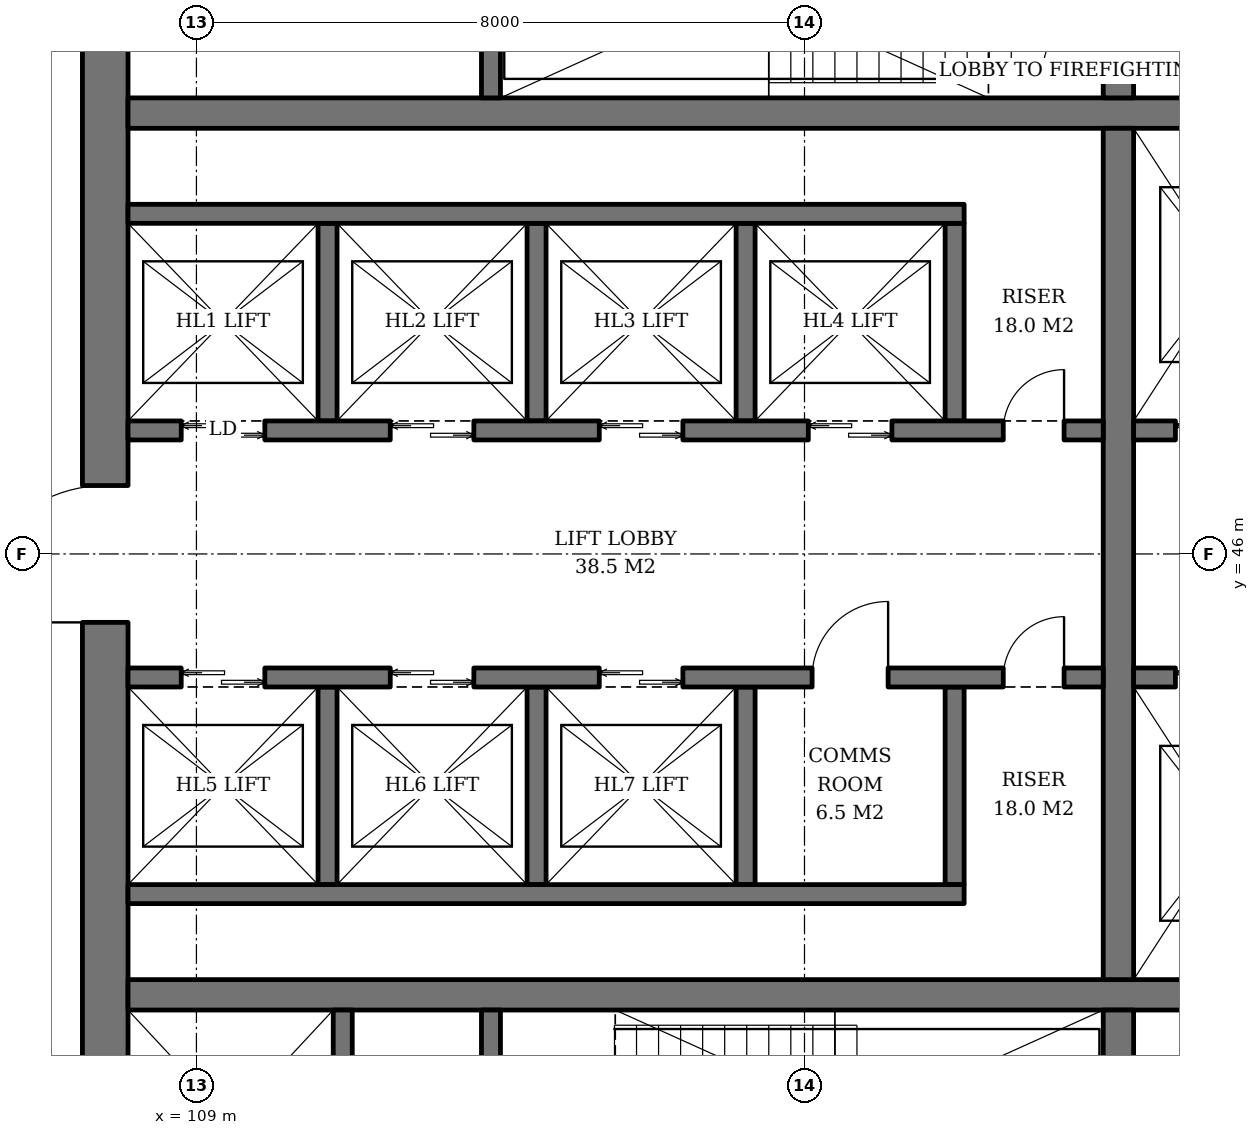
"""IFC4 building model, lengths in metres.
Left out: names, types, materials, properties, quantities, classifications, styles, units other than length and angle.
Written with IfcOpenShell. Run it as: python <this file> out.ifc"""

import sys

from ifc_helpers import new_model, si_unit, direction, frame, frame_2d, origin, place, context, subcontext, project, spatial, rectangle, extrude, element, fill, save


model = new_model("IFC4")
c1 = context("Model", 3, precision=1e-05, world=origin(), true_north=direction((0.0, 1.0)))
c2 = subcontext(c1, "Body", "Model", "MODEL_VIEW")
j1 = project(units=[si_unit("LENGTHUNIT", "METRE"), si_unit("PLANEANGLEUNIT", "RADIAN")], contexts=[c1])
p1 = place(None, origin())
s1 = spatial("IfcSite", under=j1, at=p1, CompositionType="ELEMENT")
p2 = place(p1, origin())
s2 = spatial("IfcBuilding", under=s1, at=p2, CompositionType="ELEMENT")
p3 = place(p2, frame((0.0, 0.0, 36.2)))
s3 = spatial("IfcBuildingStorey", under=s2, at=p3, CompositionType="ELEMENT", Elevation=36.2)
p4 = place(p3, frame((107.8, 37.1, 0.0), z_axis=(0.0, 0.0, 1.0), x_axis=(0.0, 1.0, 0.0)))
e1 = element("IfcWall", 1, at=p4, inside=s3, PredefinedType="SHEAR", context=c2, shape_type="SweptSolid", body=[
    extrude(rectangle(XDim=17.8, YDim=0.6, at=frame_2d((8.9, 0.0))), origin(), (0.0, 0.0, 1.0), 3.8),
])
p5 = place(p4, frame((8.0, 0.0, 0.0)))
e2 = element("IfcOpeningElement", 2, at=p5, cuts=e1, PredefinedType="OPENING", context=c2, shape_type="SweptSolid", body=[
    extrude(rectangle(XDim=1.8, YDim=2.4, at=frame_2d((0.9, 1.2))), frame((0.0, 0.31, 0.0), z_axis=(0.0, -1.0, 0.0), x_axis=(1.0, 0.0, 0.0)), (0.0, 0.0, 1.0), 0.62),
])
for number, where, z_axis, x_axis in (
    (3, (108.1, 40.2, 0.0), (0.0, 0.0, 1.0), (1.0, 0.0, 0.0)),
    (4, (108.1, 51.8, 0.0), (0.0, 0.0, 1.0), (1.0, 0.0, 0.0)),
):
    element("IfcWall", number, at=place(p3, frame(where, z_axis=z_axis, x_axis=x_axis)), inside=s3, PredefinedType="SHEAR", context=c2, shape_type="SweptSolid", body=[
        extrude(rectangle(XDim=17.8, YDim=0.4, at=frame_2d((8.9, 0.0))), origin(), (0.0, 0.0, 1.0), 3.8),
    ])
p6 = place(p3, frame((121.13, 37.1, 0.0), z_axis=(0.0, 0.0, 1.0), x_axis=(0.0, 1.0, 0.0)))
e5 = element("IfcWall", 5, at=p6, inside=s3, PredefinedType="SHEAR", context=c2, shape_type="SweptSolid", body=[
    extrude(rectangle(XDim=2.9, YDim=0.4, at=frame_2d((1.45, 0.0))), origin(), (0.0, 0.0, 1.0), 3.8),
])
p7 = place(p3, frame((121.13, 40.4, 0.0), z_axis=(0.0, 0.0, 1.0), x_axis=(0.0, 1.0, 0.0)))
e6 = element("IfcWall", 6, at=p7, inside=s3, PredefinedType="SHEAR", context=c2, shape_type="SweptSolid", body=[
    extrude(rectangle(XDim=11.2, YDim=0.4, at=frame_2d((5.6, 0.0))), origin(), (0.0, 0.0, 1.0), 3.8),
])
p8 = place(p3, frame((121.13, 52.0, 0.0), z_axis=(0.0, 0.0, 1.0), x_axis=(0.0, 1.0, 0.0)))
e7 = element("IfcWall", 7, at=p8, inside=s3, PredefinedType="SHEAR", context=c2, shape_type="SweptSolid", body=[
    extrude(rectangle(XDim=2.9, YDim=0.4, at=frame_2d((1.45, 0.0))), origin(), (0.0, 0.0, 1.0), 3.8),
])
p9 = place(p8, frame((0.3, 0.0, 0.0)))
e8 = element("IfcOpeningElement", 8, at=p9, cuts=e7, PredefinedType="OPENING", context=c2, shape_type="SweptSolid", body=[
    extrude(rectangle(XDim=1.0, YDim=2.1, at=frame_2d((0.5, 1.05))), frame((0.0, 0.21, 0.0), z_axis=(0.0, -1.0, 0.0), x_axis=(1.0, 0.0, 0.0)), (0.0, 0.0, 1.0), 0.42),
])
p10 = place(p3, frame((110.925, 37.1, 0.0), z_axis=(0.0, 0.0, 1.0), x_axis=(0.0, 1.0, 0.0)))
e9 = element("IfcWall", 9, at=p10, inside=s3, PredefinedType="SHEAR", context=c2, shape_type="SweptSolid", body=[
    extrude(rectangle(XDim=2.9, YDim=0.25, at=frame_2d((1.45, 0.0))), origin(), (0.0, 0.0, 1.0), 3.8),
])
p11 = place(p10, frame((0.8, 0.0, 0.0)))
e10 = element("IfcOpeningElement", 10, at=p11, cuts=e9, PredefinedType="OPENING", context=c2, shape_type="SweptSolid", body=[
    extrude(rectangle(XDim=1.3, YDim=2.2, at=frame_2d((0.65, 1.1))), frame((0.0, 0.135, 0.0), z_axis=(0.0, -1.0, 0.0), x_axis=(1.0, 0.0, 0.0)), (0.0, 0.0, 1.0), 0.27),
])
p12 = place(p3, frame((112.875, 37.1, 0.0), z_axis=(0.0, 0.0, 1.0), x_axis=(0.0, 1.0, 0.0)))
e11 = element("IfcWall", 11, at=p12, inside=s3, PredefinedType="SHEAR", context=c2, shape_type="SweptSolid", body=[
    extrude(rectangle(XDim=2.9, YDim=0.25, at=frame_2d((1.45, 0.0))), origin(), (0.0, 0.0, 1.0), 3.8),
])
p13 = place(p12, frame((0.75, 0.0, 0.0)))
e12 = element("IfcOpeningElement", 12, at=p13, cuts=e11, PredefinedType="OPENING", context=c2, shape_type="SweptSolid", body=[
    extrude(rectangle(XDim=1.2, YDim=2.1, at=frame_2d((0.6, 1.05))), frame((0.0, 0.135, 0.0), z_axis=(0.0, -1.0, 0.0), x_axis=(1.0, 0.0, 0.0)), (0.0, 0.0, 1.0), 0.27),
])
p14 = place(p3, frame((112.875, 52.0, 0.0), z_axis=(0.0, 0.0, 1.0), x_axis=(0.0, 1.0, 0.0)))
e13 = element("IfcWall", 13, at=p14, inside=s3, PredefinedType="SHEAR", context=c2, shape_type="SweptSolid", body=[
    extrude(rectangle(XDim=2.9, YDim=0.25, at=frame_2d((1.45, 0.0))), origin(), (0.0, 0.0, 1.0), 3.8),
])
for number, where, z_axis, x_axis in (
    (14, (110.725, 47.75, 0.0), (0.0, 0.0, 1.0), (0.0, 1.0, 0.0)),
    (15, (113.475, 47.75, 0.0), (0.0, 0.0, 1.0), (0.0, 1.0, 0.0)),
    (16, (116.225, 47.75, 0.0), (0.0, 0.0, 1.0), (0.0, 1.0, 0.0)),
    (17, (118.975, 47.75, 0.0), (0.0, 0.0, 1.0), (0.0, 1.0, 0.0)),
):
    element("IfcWall", number, at=place(p3, frame(where, z_axis=z_axis, x_axis=x_axis)), inside=s3, PredefinedType="SHEAR", context=c2, shape_type="SweptSolid", body=[
        extrude(rectangle(XDim=2.6, YDim=0.25, at=frame_2d((1.3, 0.0))), origin(), (0.0, 0.0, 1.0), 3.8),
    ])
p15 = place(p3, frame((108.1, 50.475, 0.0), z_axis=(0.0, 0.0, 1.0), x_axis=(1.0, 0.0, 0.0)))
e18 = element("IfcWall", 18, at=p15, inside=s3, PredefinedType="SHEAR", context=c2, shape_type="SweptSolid", body=[
    extrude(rectangle(XDim=11.0, YDim=0.25, at=frame_2d((5.5, 0.0))), origin(), (0.0, 0.0, 1.0), 3.8),
])
p16 = place(p3, frame((108.1, 47.625, 0.0), z_axis=(0.0, 0.0, 1.0), x_axis=(1.0, 0.0, 0.0)))
e19 = element("IfcWall", 19, at=p16, inside=s3, PredefinedType="SHEAR", context=c2, shape_type="SweptSolid", body=[
    extrude(rectangle(XDim=12.83, YDim=0.25, at=frame_2d((6.415, 0.0))), origin(), (0.0, 0.0, 1.0), 3.8),
])
p17 = place(p16, frame((0.7, 0.0, 0.0)))
e20 = element("IfcOpeningElement", 20, at=p17, cuts=e19, PredefinedType="OPENING", context=c2, shape_type="SweptSolid", body=[
    extrude(rectangle(XDim=1.1, YDim=2.2, at=frame_2d((0.55, 1.1))), frame((0.0, 0.135, 0.0), z_axis=(0.0, -1.0, 0.0), x_axis=(1.0, 0.0, 0.0)), (0.0, 0.0, 1.0), 0.27),
])
p18 = place(p16, frame((3.45, 0.0, 0.0)))
e21 = element("IfcOpeningElement", 21, at=p18, cuts=e19, PredefinedType="OPENING", context=c2, shape_type="SweptSolid", body=[
    extrude(rectangle(XDim=1.1, YDim=2.2, at=frame_2d((0.55, 1.1))), frame((0.0, 0.135, 0.0), z_axis=(0.0, -1.0, 0.0), x_axis=(1.0, 0.0, 0.0)), (0.0, 0.0, 1.0), 0.27),
])
p19 = place(p16, frame((6.2, 0.0, 0.0)))
e22 = element("IfcOpeningElement", 22, at=p19, cuts=e19, PredefinedType="OPENING", context=c2, shape_type="SweptSolid", body=[
    extrude(rectangle(XDim=1.1, YDim=2.2, at=frame_2d((0.55, 1.1))), frame((0.0, 0.135, 0.0), z_axis=(0.0, -1.0, 0.0), x_axis=(1.0, 0.0, 0.0)), (0.0, 0.0, 1.0), 0.27),
])
p20 = place(p16, frame((8.95, 0.0, 0.0)))
e23 = element("IfcOpeningElement", 23, at=p20, cuts=e19, PredefinedType="OPENING", context=c2, shape_type="SweptSolid", body=[
    extrude(rectangle(XDim=1.1, YDim=2.2, at=frame_2d((0.55, 1.1))), frame((0.0, 0.135, 0.0), z_axis=(0.0, -1.0, 0.0), x_axis=(1.0, 0.0, 0.0)), (0.0, 0.0, 1.0), 0.27),
])
p21 = place(p16, frame((11.515, 0.0, 0.0)))
e24 = element("IfcOpeningElement", 24, at=p21, cuts=e19, PredefinedType="OPENING", context=c2, shape_type="SweptSolid", body=[
    extrude(rectangle(XDim=0.8, YDim=2.0, at=frame_2d((0.4, 1.0))), frame((0.0, 0.135, 0.0), z_axis=(0.0, -1.0, 0.0), x_axis=(1.0, 0.0, 0.0)), (0.0, 0.0, 1.0), 0.27),
])
for number, where, z_axis, x_axis in (
    (25, (110.725, 44.25, 0.0), (0.0, 0.0, 1.0), (0.0, -1.0, 0.0)),
    (26, (113.475, 44.25, 0.0), (0.0, 0.0, 1.0), (0.0, -1.0, 0.0)),
    (27, (116.225, 44.25, 0.0), (0.0, 0.0, 1.0), (0.0, -1.0, 0.0)),
    (28, (118.975, 44.25, 0.0), (0.0, 0.0, 1.0), (0.0, -1.0, 0.0)),
):
    element("IfcWall", number, at=place(p3, frame(where, z_axis=z_axis, x_axis=x_axis)), inside=s3, PredefinedType="SHEAR", context=c2, shape_type="SweptSolid", body=[
        extrude(rectangle(XDim=2.6, YDim=0.25, at=frame_2d((1.3, 0.0))), origin(), (0.0, 0.0, 1.0), 3.8),
    ])
p22 = place(p3, frame((108.1, 41.525, 0.0), z_axis=(0.0, 0.0, 1.0), x_axis=(1.0, 0.0, 0.0)))
e29 = element("IfcWall", 29, at=p22, inside=s3, PredefinedType="SHEAR", context=c2, shape_type="SweptSolid", body=[
    extrude(rectangle(XDim=11.0, YDim=0.25, at=frame_2d((5.5, 0.0))), origin(), (0.0, 0.0, 1.0), 3.8),
])
p23 = place(p3, frame((108.1, 44.375, 0.0), z_axis=(0.0, 0.0, 1.0), x_axis=(1.0, 0.0, 0.0)))
e30 = element("IfcWall", 30, at=p23, inside=s3, PredefinedType="SHEAR", context=c2, shape_type="SweptSolid", body=[
    extrude(rectangle(XDim=12.83, YDim=0.25, at=frame_2d((6.415, 0.0))), origin(), (0.0, 0.0, 1.0), 3.8),
])
p24 = place(p23, frame((0.7, 0.0, 0.0)))
e31 = element("IfcOpeningElement", 31, at=p24, cuts=e30, PredefinedType="OPENING", context=c2, shape_type="SweptSolid", body=[
    extrude(rectangle(XDim=1.1, YDim=2.2, at=frame_2d((0.55, 1.1))), frame((0.0, 0.135, 0.0), z_axis=(0.0, -1.0, 0.0), x_axis=(1.0, 0.0, 0.0)), (0.0, 0.0, 1.0), 0.27),
])
p25 = place(p23, frame((3.45, 0.0, 0.0)))
e32 = element("IfcOpeningElement", 32, at=p25, cuts=e30, PredefinedType="OPENING", context=c2, shape_type="SweptSolid", body=[
    extrude(rectangle(XDim=1.1, YDim=2.2, at=frame_2d((0.55, 1.1))), frame((0.0, 0.135, 0.0), z_axis=(0.0, -1.0, 0.0), x_axis=(1.0, 0.0, 0.0)), (0.0, 0.0, 1.0), 0.27),
])
p26 = place(p23, frame((6.2, 0.0, 0.0)))
e33 = element("IfcOpeningElement", 33, at=p26, cuts=e30, PredefinedType="OPENING", context=c2, shape_type="SweptSolid", body=[
    extrude(rectangle(XDim=1.1, YDim=2.2, at=frame_2d((0.55, 1.1))), frame((0.0, 0.135, 0.0), z_axis=(0.0, -1.0, 0.0), x_axis=(1.0, 0.0, 0.0)), (0.0, 0.0, 1.0), 0.27),
])
p27 = place(p23, frame((9.0, 0.0, 0.0)))
e34 = element("IfcOpeningElement", 34, at=p27, cuts=e30, PredefinedType="OPENING", context=c2, shape_type="SweptSolid", body=[
    extrude(rectangle(XDim=1.0, YDim=2.1, at=frame_2d((0.5, 1.05))), frame((0.0, 0.135, 0.0), z_axis=(0.0, -1.0, 0.0), x_axis=(1.0, 0.0, 0.0)), (0.0, 0.0, 1.0), 0.27),
])
p28 = place(p23, frame((11.515, 0.0, 0.0)))
e35 = element("IfcOpeningElement", 35, at=p28, cuts=e30, PredefinedType="OPENING", context=c2, shape_type="SweptSolid", body=[
    extrude(rectangle(XDim=0.8, YDim=2.0, at=frame_2d((0.4, 1.0))), frame((0.0, 0.135, 0.0), z_axis=(0.0, -1.0, 0.0), x_axis=(1.0, 0.0, 0.0)), (0.0, 0.0, 1.0), 0.27),
])
p29 = place(p3, frame((121.33, 47.625, 0.0), z_axis=(0.0, 0.0, 1.0), x_axis=(1.0, 0.0, 0.0)))
e36 = element("IfcWall", 36, at=p29, inside=s3, PredefinedType="SHEAR", context=c2, shape_type="SweptSolid", body=[
    extrude(rectangle(XDim=4.57, YDim=0.25, at=frame_2d((2.285, 0.0))), origin(), (0.0, 0.0, 1.0), 3.8),
])
p30 = place(p29, frame((0.55, 0.0, 0.0)))
e37 = element("IfcOpeningElement", 37, at=p30, cuts=e36, PredefinedType="OPENING", context=c2, shape_type="SweptSolid", body=[
    extrude(rectangle(XDim=1.4, YDim=2.4, at=frame_2d((0.7, 1.2))), frame((0.0, 0.135, 0.0), z_axis=(0.0, -1.0, 0.0), x_axis=(1.0, 0.0, 0.0)), (0.0, 0.0, 1.0), 0.27),
])
p31 = place(p29, frame((3.26, 0.0, 0.0)))
e38 = element("IfcOpeningElement", 38, at=p31, cuts=e36, PredefinedType="OPENING", context=c2, shape_type="SweptSolid", body=[
    extrude(rectangle(XDim=0.8, YDim=2.0, at=frame_2d((0.4, 1.0))), frame((0.0, 0.135, 0.0), z_axis=(0.0, -1.0, 0.0), x_axis=(1.0, 0.0, 0.0)), (0.0, 0.0, 1.0), 0.27),
])
p32 = place(p3, frame((121.33, 44.375, 0.0), z_axis=(0.0, 0.0, 1.0), x_axis=(1.0, 0.0, 0.0)))
e39 = element("IfcWall", 39, at=p32, inside=s3, PredefinedType="SHEAR", context=c2, shape_type="SweptSolid", body=[
    extrude(rectangle(XDim=4.57, YDim=0.25, at=frame_2d((2.285, 0.0))), origin(), (0.0, 0.0, 1.0), 3.8),
])
p33 = place(p32, frame((0.55, 0.0, 0.0)))
e40 = element("IfcOpeningElement", 40, at=p33, cuts=e39, PredefinedType="OPENING", context=c2, shape_type="SweptSolid", body=[
    extrude(rectangle(XDim=1.4, YDim=2.4, at=frame_2d((0.7, 1.2))), frame((0.0, 0.135, 0.0), z_axis=(0.0, -1.0, 0.0), x_axis=(1.0, 0.0, 0.0)), (0.0, 0.0, 1.0), 0.27),
])
p34 = place(p32, frame((3.26, 0.0, 0.0)))
e41 = element("IfcOpeningElement", 41, at=p34, cuts=e39, PredefinedType="OPENING", context=c2, shape_type="SweptSolid", body=[
    extrude(rectangle(XDim=0.8, YDim=2.0, at=frame_2d((0.4, 1.0))), frame((0.0, 0.135, 0.0), z_axis=(0.0, -1.0, 0.0), x_axis=(1.0, 0.0, 0.0)), (0.0, 0.0, 1.0), 0.27),
])
p35 = place(p17, origin())
e42 = element("IfcDoor", 42, at=p35, inside=s3, OperationType="DOUBLE_DOOR_SLIDING", PredefinedType="DOOR", context=c2, shape_type="SweptSolid", body=[
    extrude(rectangle(XDim=1.1, YDim=2.2, at=frame_2d((0.55, 1.1))), frame((0.0, 0.025, 0.0), z_axis=(0.0, -1.0, 0.0), x_axis=(1.0, 0.0, 0.0)), (0.0, 0.0, 1.0), 0.05),
])
fill(e20, e42)
p36 = place(p18, origin())
e43 = element("IfcDoor", 43, at=p36, inside=s3, OperationType="DOUBLE_DOOR_SLIDING", PredefinedType="DOOR", context=c2, shape_type="SweptSolid", body=[
    extrude(rectangle(XDim=1.1, YDim=2.2, at=frame_2d((0.55, 1.1))), frame((0.0, 0.025, 0.0), z_axis=(0.0, -1.0, 0.0), x_axis=(1.0, 0.0, 0.0)), (0.0, 0.0, 1.0), 0.05),
])
fill(e21, e43)
p37 = place(p19, origin())
e44 = element("IfcDoor", 44, at=p37, inside=s3, OperationType="DOUBLE_DOOR_SLIDING", PredefinedType="DOOR", context=c2, shape_type="SweptSolid", body=[
    extrude(rectangle(XDim=1.1, YDim=2.2, at=frame_2d((0.55, 1.1))), frame((0.0, 0.025, 0.0), z_axis=(0.0, -1.0, 0.0), x_axis=(1.0, 0.0, 0.0)), (0.0, 0.0, 1.0), 0.05),
])
fill(e22, e44)
p38 = place(p20, origin())
e45 = element("IfcDoor", 45, at=p38, inside=s3, OperationType="DOUBLE_DOOR_SLIDING", PredefinedType="DOOR", context=c2, shape_type="SweptSolid", body=[
    extrude(rectangle(XDim=1.1, YDim=2.2, at=frame_2d((0.55, 1.1))), frame((0.0, 0.025, 0.0), z_axis=(0.0, -1.0, 0.0), x_axis=(1.0, 0.0, 0.0)), (0.0, 0.0, 1.0), 0.05),
])
fill(e23, e45)
p39 = place(p21, origin())
e46 = element("IfcDoor", 46, at=p39, inside=s3, OperationType="SINGLE_SWING_RIGHT", PredefinedType="DOOR", context=c2, shape_type="SweptSolid", body=[
    extrude(rectangle(XDim=0.8, YDim=2.0, at=frame_2d((0.4, 1.0))), frame((0.0, 0.025, 0.0), z_axis=(0.0, -1.0, 0.0), x_axis=(1.0, 0.0, 0.0)), (0.0, 0.0, 1.0), 0.05),
])
fill(e24, e46)
p40 = place(p24, origin())
e47 = element("IfcDoor", 47, at=p40, inside=s3, OperationType="DOUBLE_DOOR_SLIDING", PredefinedType="DOOR", context=c2, shape_type="SweptSolid", body=[
    extrude(rectangle(XDim=1.1, YDim=2.2, at=frame_2d((0.55, 1.1))), frame((0.0, 0.025, 0.0), z_axis=(0.0, -1.0, 0.0), x_axis=(1.0, 0.0, 0.0)), (0.0, 0.0, 1.0), 0.05),
])
fill(e31, e47)
p41 = place(p25, origin())
e48 = element("IfcDoor", 48, at=p41, inside=s3, OperationType="DOUBLE_DOOR_SLIDING", PredefinedType="DOOR", context=c2, shape_type="SweptSolid", body=[
    extrude(rectangle(XDim=1.1, YDim=2.2, at=frame_2d((0.55, 1.1))), frame((0.0, 0.025, 0.0), z_axis=(0.0, -1.0, 0.0), x_axis=(1.0, 0.0, 0.0)), (0.0, 0.0, 1.0), 0.05),
])
fill(e32, e48)
p42 = place(p26, origin())
e49 = element("IfcDoor", 49, at=p42, inside=s3, OperationType="DOUBLE_DOOR_SLIDING", PredefinedType="DOOR", context=c2, shape_type="SweptSolid", body=[
    extrude(rectangle(XDim=1.1, YDim=2.2, at=frame_2d((0.55, 1.1))), frame((0.0, 0.025, 0.0), z_axis=(0.0, -1.0, 0.0), x_axis=(1.0, 0.0, 0.0)), (0.0, 0.0, 1.0), 0.05),
])
fill(e33, e49)
p43 = place(p27, origin())
e50 = element("IfcDoor", 50, at=p43, inside=s3, OperationType="SINGLE_SWING_RIGHT", PredefinedType="DOOR", context=c2, shape_type="SweptSolid", body=[
    extrude(rectangle(XDim=1.0, YDim=2.1, at=frame_2d((0.5, 1.05))), frame((0.0, 0.025, 0.0), z_axis=(0.0, -1.0, 0.0), x_axis=(1.0, 0.0, 0.0)), (0.0, 0.0, 1.0), 0.05),
])
fill(e34, e50)
p44 = place(p28, origin())
e51 = element("IfcDoor", 51, at=p44, inside=s3, OperationType="SINGLE_SWING_RIGHT", PredefinedType="DOOR", context=c2, shape_type="SweptSolid", body=[
    extrude(rectangle(XDim=0.8, YDim=2.0, at=frame_2d((0.4, 1.0))), frame((0.0, 0.025, 0.0), z_axis=(0.0, -1.0, 0.0), x_axis=(1.0, 0.0, 0.0)), (0.0, 0.0, 1.0), 0.05),
])
fill(e35, e51)
p45 = place(p30, origin())
e52 = element("IfcDoor", 52, at=p45, inside=s3, OperationType="DOUBLE_DOOR_SLIDING", PredefinedType="DOOR", context=c2, shape_type="SweptSolid", body=[
    extrude(rectangle(XDim=1.4, YDim=2.4, at=frame_2d((0.7, 1.2))), frame((0.0, 0.025, 0.0), z_axis=(0.0, -1.0, 0.0), x_axis=(1.0, 0.0, 0.0)), (0.0, 0.0, 1.0), 0.05),
])
fill(e37, e52)
p46 = place(p33, origin())
e53 = element("IfcDoor", 53, at=p46, inside=s3, OperationType="DOUBLE_DOOR_SLIDING", PredefinedType="DOOR", context=c2, shape_type="SweptSolid", body=[
    extrude(rectangle(XDim=1.4, YDim=2.4, at=frame_2d((0.7, 1.2))), frame((0.0, 0.025, 0.0), z_axis=(0.0, -1.0, 0.0), x_axis=(1.0, 0.0, 0.0)), (0.0, 0.0, 1.0), 0.05),
])
fill(e40, e53)
p47 = place(p9, origin())
e54 = element("IfcDoor", 54, at=p47, inside=s3, OperationType="SINGLE_SWING_LEFT", PredefinedType="DOOR", context=c2, shape_type="SweptSolid", body=[
    extrude(rectangle(XDim=1.0, YDim=2.1, at=frame_2d((0.5, 1.05))), frame((0.0, 0.025, 0.0), z_axis=(0.0, -1.0, 0.0), x_axis=(1.0, 0.0, 0.0)), (0.0, 0.0, 1.0), 0.05),
])
fill(e8, e54)
p48 = place(p5, origin())
e55 = element("IfcDoor", 55, at=p48, inside=s3, OperationType="DOUBLE_DOOR_SINGLE_SWING", PredefinedType="DOOR", context=c2, shape_type="SweptSolid", body=[
    extrude(rectangle(XDim=1.8, YDim=2.4, at=frame_2d((0.9, 1.2))), frame((0.0, 0.025, 0.0), z_axis=(0.0, -1.0, 0.0), x_axis=(1.0, 0.0, 0.0)), (0.0, 0.0, 1.0), 0.05),
])
fill(e2, e55)
save(model, sys.argv[1])
